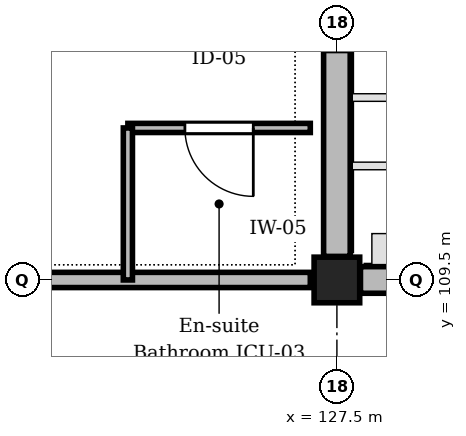
"""IFC4 building model, lengths in metres.
Left out: names, types, materials, properties, quantities, classifications, styles, units other than length and angle.
Written with IfcOpenShell. Run it as: python <this file> out.ifc"""

import sys

from ifc_helpers import new_model, si_unit, direction, frame, frame_2d, origin, origin_2d, place, context, subcontext, project, spatial, rectangle, extrude, element, fill, save


model = new_model("IFC4")
c1 = context("Model", 3, precision=1e-05, world=origin(), true_north=direction((0.0, 1.0)))
c2 = subcontext(c1, "Body", "Model", "MODEL_VIEW")
j1 = project(units=[si_unit("LENGTHUNIT", "METRE"), si_unit("PLANEANGLEUNIT", "RADIAN")], contexts=[c1])
p1 = place(None, origin())
s1 = spatial("IfcSite", under=j1, at=p1, CompositionType="ELEMENT")
p2 = place(p1, origin())
s2 = spatial("IfcBuilding", under=s1, at=p2, CompositionType="ELEMENT")
p3 = place(p2, frame((0.0, 0.0, 9.3)))
s3 = spatial("IfcBuildingStorey", under=s2, at=p3, CompositionType="ELEMENT", Elevation=9.3)
p4 = place(p3, frame((127.5, 109.5, 0.0), z_axis=(0.0, 0.0, 1.0), x_axis=(1.0, 0.0, 0.0)))
e1 = element("IfcColumn", 1, at=p4, inside=s3, PredefinedType="COLUMN", context=c2, shape_type="SweptSolid", body=[
    extrude(rectangle(XDim=0.6, YDim=0.6, at=origin_2d()), origin(), (0.0, 0.0, 1.0), 4.8),
])
p5 = place(p3, frame((127.5, 116.69, 0.0), z_axis=(0.0, 0.0, 1.0), x_axis=(0.0, -1.0, 0.0)))
e2 = element("IfcWall", 2, at=p5, inside=s3, PredefinedType="STANDARD", context=c2, shape_type="SweptSolid", body=[
    extrude(rectangle(XDim=6.88, YDim=0.35, at=frame_2d((3.44, 0.0))), origin(), (0.0, 0.0, 1.0), 3.95),
])
p6 = place(p5, frame((2.69, 0.0, 0.9)))
e3 = element("IfcOpeningElement", 3, at=p6, cuts=e2, PredefinedType="OPENING", context=c2, shape_type="SweptSolid", body=[
    extrude(rectangle(XDim=1.5, YDim=2.1, at=frame_2d((0.75, 1.05))), frame((0.0, 0.185, 0.0), z_axis=(0.0, -1.0, 0.0), x_axis=(1.0, 0.0, 0.0)), (0.0, 0.0, 1.0), 0.37),
])
p7 = place(p3, frame((127.81, 109.5, 0.0), z_axis=(0.0, 0.0, 1.0), x_axis=(1.0, 0.0, 0.0)))
e4 = element("IfcWall", 4, at=p7, inside=s3, PredefinedType="STANDARD", context=c2, shape_type="SweptSolid", body=[
    extrude(rectangle(XDim=6.88, YDim=0.35, at=frame_2d((3.44, 0.0))), origin(), (0.0, 0.0, 1.0), 3.95),
])
p8 = place(p7, frame((2.69, 0.0, 0.9)))
e5 = element("IfcOpeningElement", 5, at=p8, cuts=e4, PredefinedType="OPENING", context=c2, shape_type="SweptSolid", body=[
    extrude(rectangle(XDim=1.5, YDim=2.1, at=frame_2d((0.75, 1.05))), frame((0.0, 0.185, 0.0), z_axis=(0.0, -1.0, 0.0), x_axis=(1.0, 0.0, 0.0)), (0.0, 0.0, 1.0), 0.37),
])
p9 = place(p3, frame((112.8, 109.5, 0.0), z_axis=(0.0, 0.0, 1.0), x_axis=(1.0, 0.0, 0.0)))
e6 = element("IfcWall", 6, at=p9, inside=s3, PredefinedType="STANDARD", context=c2, shape_type="SweptSolid", body=[
    extrude(rectangle(XDim=14.35, YDim=0.2, at=frame_2d((7.175, 0.0))), origin(), (0.0, 0.0, 1.0), 3.985),
])
p10 = place(p9, frame((2.81, 0.0, 0.0)))
e7 = element("IfcOpeningElement", 7, at=p10, cuts=e6, PredefinedType="OPENING", context=c2, shape_type="SweptSolid", body=[
    extrude(rectangle(XDim=1.05, YDim=2.2, at=frame_2d((0.525, 1.1))), frame((0.0, 0.11, 0.0), z_axis=(0.0, -1.0, 0.0), x_axis=(1.0, 0.0, 0.0)), (0.0, 0.0, 1.0), 0.22),
])
p11 = place(p3, frame((127.15, 111.5, 0.0), z_axis=(0.0, 0.0, 1.0), x_axis=(-1.0, 0.0, 0.0)))
e8 = element("IfcWall", 8, at=p11, inside=s3, PredefinedType="PARTITIONING", context=c2, shape_type="SweptSolid", body=[
    extrude(rectangle(XDim=2.4, YDim=0.12, at=frame_2d((1.2, 0.0))), origin(), (0.0, 0.0, 1.0), 4.535),
])
p12 = place(p11, frame((0.75, 0.0, 0.0)))
e9 = element("IfcOpeningElement", 9, at=p12, cuts=e8, PredefinedType="OPENING", context=c2, shape_type="SweptSolid", body=[
    extrude(rectangle(XDim=0.9, YDim=2.1, at=frame_2d((0.45, 1.05))), frame((0.0, 0.07, 0.0), z_axis=(0.0, -1.0, 0.0), x_axis=(1.0, 0.0, 0.0)), (0.0, 0.0, 1.0), 0.14),
])
p13 = place(p3, frame((124.75, 109.5, 0.0), z_axis=(0.0, 0.0, 1.0), x_axis=(0.0, 1.0, 0.0)))
e10 = element("IfcWall", 10, at=p13, inside=s3, PredefinedType="PARTITIONING", context=c2, shape_type="SweptSolid", body=[
    extrude(rectangle(XDim=2.0, YDim=0.12, at=frame_2d((1.0, 0.0))), origin(), (0.0, 0.0, 1.0), 4.535),
])
p14 = place(p12, origin())
e11 = element("IfcDoor", 11, at=p14, inside=s3, OperationType="SINGLE_SWING_LEFT", PredefinedType="DOOR", context=c2, shape_type="SweptSolid", body=[
    extrude(rectangle(XDim=0.9, YDim=2.1, at=frame_2d((0.45, 1.05))), frame((0.0, 0.025, 0.0), z_axis=(0.0, -1.0, 0.0), x_axis=(1.0, 0.0, 0.0)), (0.0, 0.0, 1.0), 0.05),
])
fill(e9, e11)
save(model, sys.argv[1])
